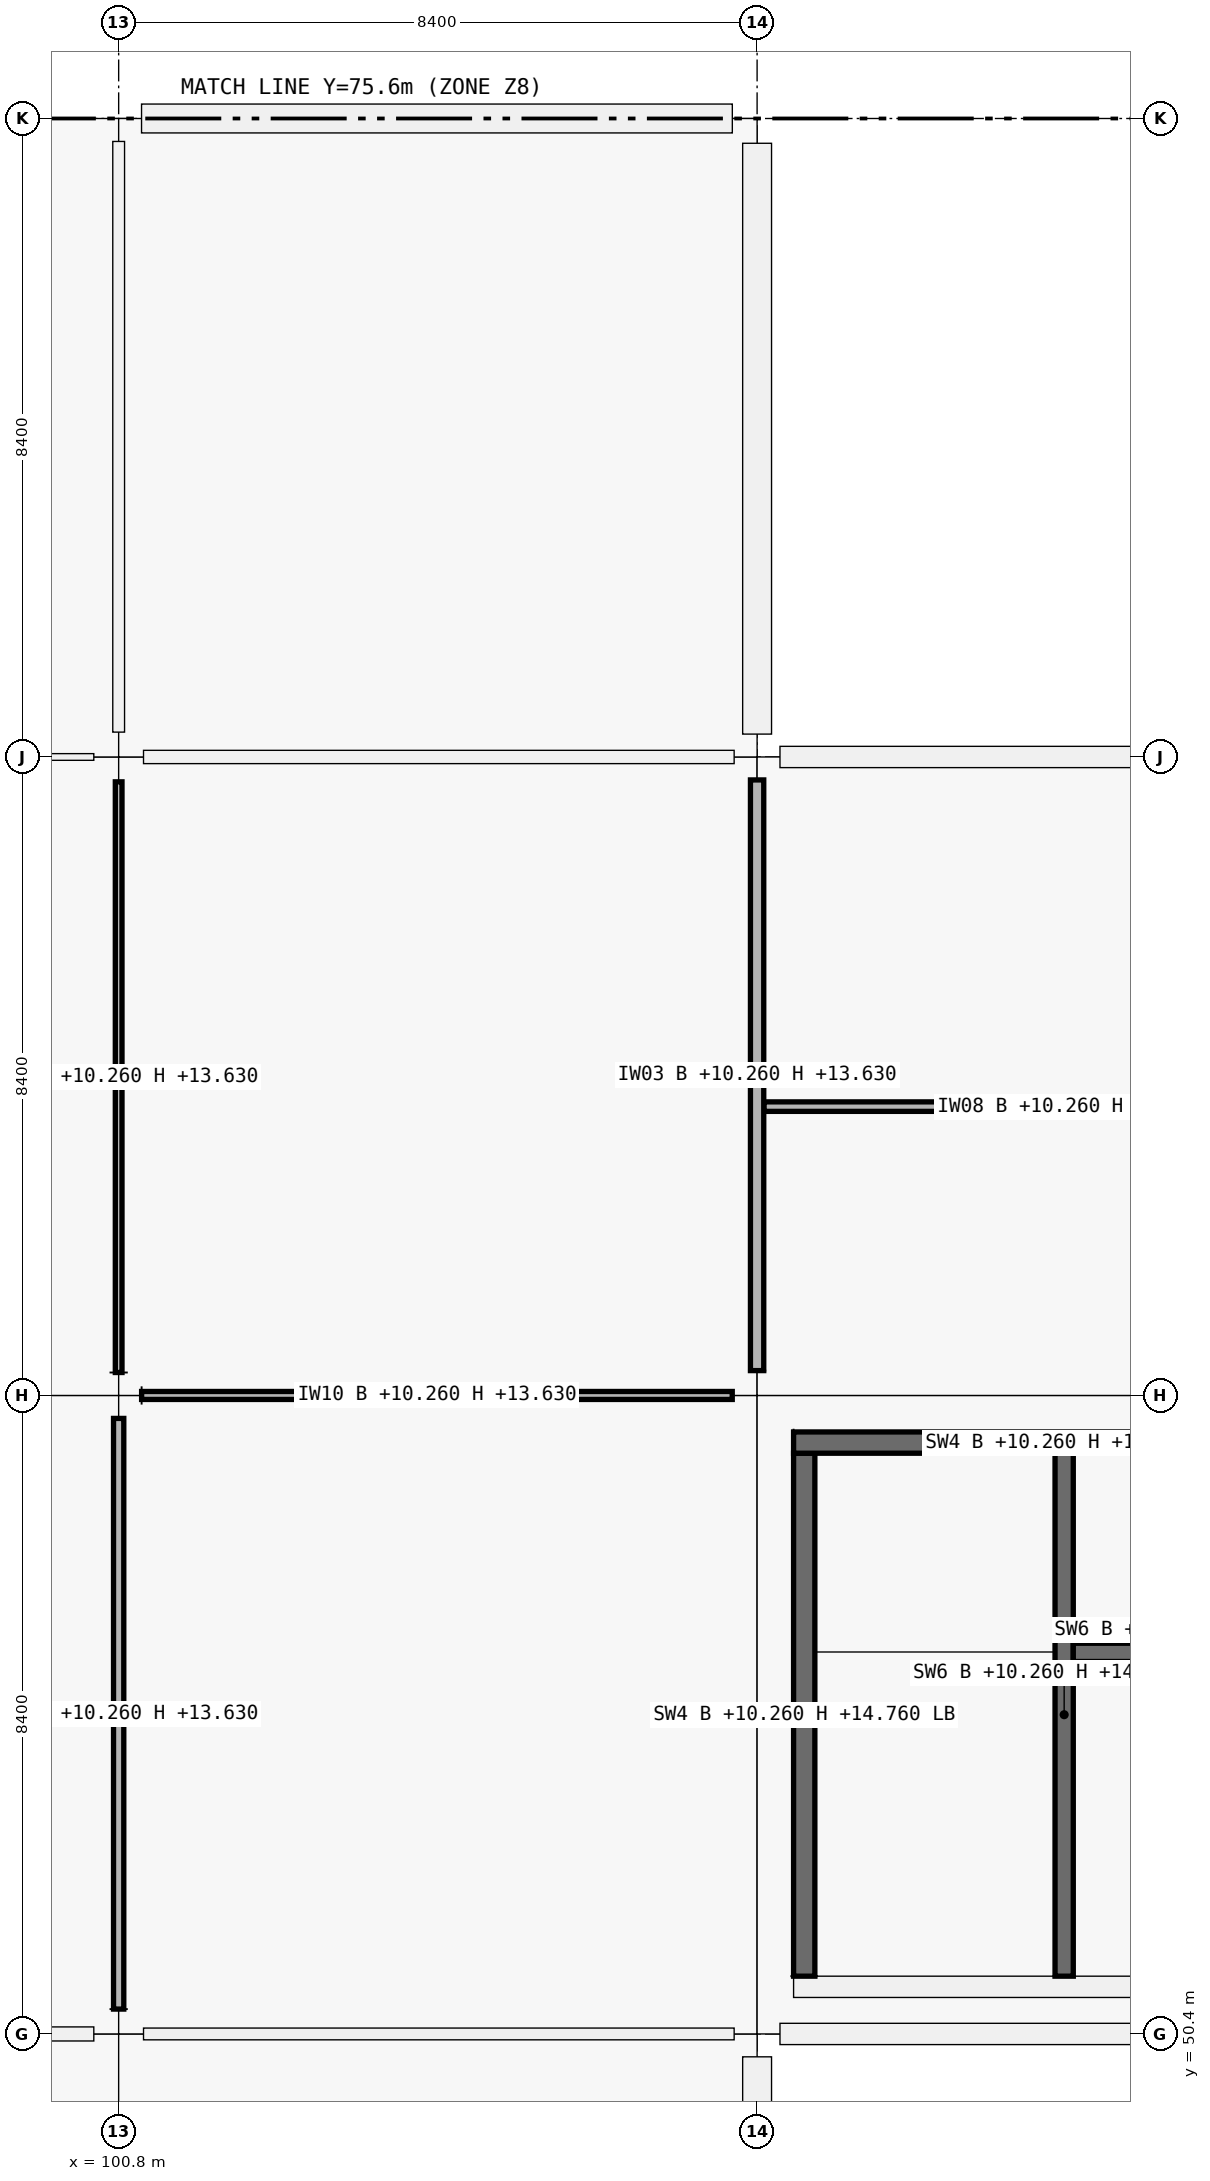
"""IFC4 building model, lengths in metres.
Left out: names, types, materials, properties, quantities, classifications, styles, units other than length and angle.
Written with IfcOpenShell. Run it as: python <this file> out.ifc"""

import sys

from ifc_helpers import new_model, si_unit, direction, frame, frame_2d, origin, origin_2d, place, context, subcontext, project, spatial, rectangle, extrude, element, fill, save


model = new_model("IFC4")
c1 = context("Model", 3, precision=1e-05, world=origin(), true_north=direction((0.0, 1.0)))
c2 = subcontext(c1, "Body", "Model", "MODEL_VIEW")
j1 = project(units=[si_unit("LENGTHUNIT", "METRE"), si_unit("PLANEANGLEUNIT", "RADIAN")], contexts=[c1])
p1 = place(None, origin())
s1 = spatial("IfcSite", under=j1, at=p1, CompositionType="ELEMENT")
p2 = place(p1, origin())
s2 = spatial("IfcBuilding", under=s1, at=p2, CompositionType="ELEMENT")
p3 = place(p2, frame((0.0, 0.0, 10.26)))
s3 = spatial("IfcBuildingStorey", under=s2, at=p3, CompositionType="ELEMENT", Elevation=10.26)
p4 = place(p3, frame((100.8, 50.4, 0.0), z_axis=(0.0, 0.0, 1.0), x_axis=(1.0, 0.0, 0.0)))
e1 = element("IfcColumn", 1, at=p4, inside=s3, PredefinedType="COLUMN", context=c2, shape_type="SweptSolid", body=[
    extrude(rectangle(XDim=0.65, YDim=0.65, at=origin_2d()), origin(), (0.0, 0.0, 1.0), 4.5),
])
p5 = place(p3, frame((100.8, 58.8, -0.3), z_axis=(0.0, 0.0, 1.0), x_axis=(1.0, 0.0, 0.0)))
e2 = element("IfcColumn", 2, at=p5, inside=s3, PredefinedType="COLUMN", context=c2, shape_type="SweptSolid", body=[
    extrude(rectangle(XDim=0.6, YDim=0.6, at=origin_2d()), origin(), (0.0, 0.0, 1.0), 4.8),
])
p6 = place(p3, frame((100.8, 67.2, 0.0), z_axis=(0.0, 0.0, 1.0), x_axis=(1.0, 0.0, 0.0)))
e3 = element("IfcColumn", 3, at=p6, inside=s3, PredefinedType="COLUMN", context=c2, shape_type="SweptSolid", body=[
    extrude(rectangle(XDim=0.65, YDim=0.65, at=origin_2d()), origin(), (0.0, 0.0, 1.0), 4.5),
])
for number, where, z_axis, x_axis in (
    (4, (100.8, 75.6, 0.0), (0.0, 0.0, 1.0), (1.0, 0.0, 0.0)),
    (5, (109.2, 50.4, 0.0), (0.0, 0.0, 1.0), (1.0, 0.0, 0.0)),
):
    element("IfcColumn", number, at=place(p3, frame(where, z_axis=z_axis, x_axis=x_axis)), inside=s3, PredefinedType="COLUMN", context=c2, shape_type="SweptSolid", body=[
        extrude(rectangle(XDim=0.6, YDim=0.6, at=origin_2d()), origin(), (0.0, 0.0, 1.0), 4.5),
    ])
p7 = place(p3, frame((109.2, 58.8, 0.0), z_axis=(0.0, 0.0, 1.0), x_axis=(1.0, 0.0, 0.0)))
e6 = element("IfcColumn", 6, at=p7, inside=s3, PredefinedType="COLUMN", context=c2, shape_type="SweptSolid", body=[
    extrude(rectangle(XDim=0.65, YDim=0.65, at=origin_2d()), origin(), (0.0, 0.0, 1.0), 4.5),
])
p8 = place(p3, frame((109.2, 67.2, 0.0), z_axis=(0.0, 0.0, 1.0), x_axis=(1.0, 0.0, 0.0)))
e7 = element("IfcColumn", 7, at=p8, inside=s3, PredefinedType="COLUMN", context=c2, shape_type="SweptSolid", body=[
    extrude(rectangle(XDim=0.6, YDim=0.6, at=origin_2d()), origin(), (0.0, 0.0, 1.0), 4.5),
])
p9 = place(p3, frame((109.2, 75.6, 0.0), z_axis=(0.0, 0.0, 1.0), x_axis=(1.0, 0.0, 0.0)))
e8 = element("IfcColumn", 8, at=p9, inside=s3, PredefinedType="COLUMN", context=c2, shape_type="SweptSolid", body=[
    extrude(rectangle(XDim=0.65, YDim=0.65, at=origin_2d()), origin(), (0.0, 0.0, 1.0), 4.5),
])
p10 = place(p3, frame((109.2, 50.099, 0.0), z_axis=(0.0, 0.0, 1.0), x_axis=(0.0, -1.0, 0.0)))
e9 = element("IfcWall", 9, at=p10, inside=s3, PredefinedType="SOLIDWALL", context=c2, shape_type="SweptSolid", body=[
    extrude(rectangle(XDim=7.773, YDim=0.38, at=frame_2d((3.887, 0.0))), origin(), (0.0, 0.0, 1.0), 3.54),
])
for number, where, z_axis, x_axis in (
    (10, (101.101, 75.6, 0.0), (0.0, 0.0, 1.0), (1.0, 0.0, 0.0)),
    (11, (109.2, 75.274, 0.0), (0.0, 0.0, 1.0), (0.0, -1.0, 0.0)),
):
    element("IfcWall", number, at=place(p3, frame(where, z_axis=z_axis, x_axis=x_axis)), inside=s3, PredefinedType="SOLIDWALL", context=c2, shape_type="SweptSolid", body=[
        extrude(rectangle(XDim=7.773, YDim=0.38, at=frame_2d((3.886, 0.0))), origin(), (0.0, 0.0, 1.0), 3.54),
    ])
p11 = place(p3, frame((117.274, 50.4, 0.0), z_axis=(0.0, 0.0, 1.0), x_axis=(-1.0, 0.0, 0.0)))
e12 = element("IfcWall", 12, at=p11, inside=s3, PredefinedType="SOLIDWALL", context=c2, shape_type="SweptSolid", body=[
    extrude(rectangle(XDim=7.773, YDim=0.28, at=frame_2d((3.886, 0.0))), origin(), (0.0, 0.0, 1.0), 3.54),
])
p12 = place(p3, frame((109.501, 67.2, 0.0), z_axis=(0.0, 0.0, 1.0), x_axis=(1.0, 0.0, 0.0)))
e13 = element("IfcWall", 13, at=p12, inside=s3, PredefinedType="SOLIDWALL", context=c2, shape_type="SweptSolid", body=[
    extrude(rectangle(XDim=7.823, YDim=0.28, at=frame_2d((3.912, 0.0))), origin(), (0.0, 0.0, 1.0), 3.54),
])
p13 = place(p12, frame((2.837, 0.0, 0.9)))
e14 = element("IfcOpeningElement", 14, at=p13, cuts=e13, PredefinedType="OPENING", context=c2, shape_type="SweptSolid", body=[
    extrude(rectangle(XDim=2.15, YDim=1.95, at=frame_2d((1.075, 0.975))), frame((0.0, 0.14, 0.0), z_axis=(0.0, -1.0, 0.0), x_axis=(1.0, 0.0, 0.0)), (0.0, 0.0, 1.0), 0.28),
])
p14 = place(p3, frame((117.12, 51.02, 0.0), z_axis=(0.0, 0.0, 1.0), x_axis=(-1.0, 0.0, 0.0)))
e15 = element("IfcWall", 15, at=p14, inside=s3, PredefinedType="SHEAR", context=c2, shape_type="SweptSolid", body=[
    extrude(rectangle(XDim=7.44, YDim=0.28, at=frame_2d((3.72, 0.0))), origin(), (0.0, 0.0, 1.0), 4.5),
])
p15 = place(p3, frame((109.82, 51.16, 0.0), z_axis=(0.0, 0.0, 1.0), x_axis=(0.0, 1.0, 0.0)))
e16 = element("IfcWall", 16, at=p15, inside=s3, PredefinedType="SHEAR", context=c2, shape_type="SweptSolid", body=[
    extrude(rectangle(XDim=6.88, YDim=0.28, at=frame_2d((3.44, 0.0))), origin(), (0.0, 0.0, 1.0), 4.5),
])
p16 = place(p3, frame((109.68, 58.18, 0.0), z_axis=(0.0, 0.0, 1.0), x_axis=(1.0, 0.0, 0.0)))
e17 = element("IfcWall", 17, at=p16, inside=s3, PredefinedType="SHEAR", context=c2, shape_type="SweptSolid", body=[
    extrude(rectangle(XDim=7.44, YDim=0.28, at=frame_2d((3.72, 0.0))), origin(), (0.0, 0.0, 1.0), 4.5),
])
p17 = place(p3, frame((113.24, 51.16, 0.0), z_axis=(0.0, 0.0, 1.0), x_axis=(0.0, 1.0, 0.0)))
e18 = element("IfcWall", 18, at=p17, inside=s3, PredefinedType="SHEAR", context=c2, shape_type="SweptSolid", body=[
    extrude(rectangle(XDim=6.88, YDim=0.24, at=frame_2d((3.44, 0.0))), origin(), (0.0, 0.0, 1.0), 4.5),
])
p18 = place(p17, frame((0.12, 0.0, 0.0)))
e19 = element("IfcOpeningElement", 19, at=p18, cuts=e18, PredefinedType="OPENING", context=c2, shape_type="SweptSolid", body=[
    extrude(rectangle(XDim=1.0, YDim=2.15, at=frame_2d((0.5, 1.075))), frame((0.0, 0.12, 0.0), z_axis=(0.0, -1.0, 0.0), x_axis=(1.0, 0.0, 0.0)), (0.0, 0.0, 1.0), 0.24),
])
p19 = place(p3, frame((113.36, 55.42, 0.0), z_axis=(0.0, 0.0, 1.0), x_axis=(1.0, 0.0, 0.0)))
e20 = element("IfcWall", 20, at=p19, inside=s3, PredefinedType="SHEAR", context=c2, shape_type="SweptSolid", body=[
    extrude(rectangle(XDim=3.48, YDim=0.24, at=frame_2d((1.74, 0.0))), origin(), (0.0, 0.0, 1.0), 4.5),
])
p20 = place(p19, frame((1.19, 0.0, 0.0)))
e21 = element("IfcOpeningElement", 21, at=p20, cuts=e20, PredefinedType="OPENING", context=c2, shape_type="SweptSolid", body=[
    extrude(rectangle(XDim=1.1, YDim=2.15, at=frame_2d((0.55, 1.075))), frame((0.0, 0.12, 0.0), z_axis=(0.0, -1.0, 0.0), x_axis=(1.0, 0.0, 0.0)), (0.0, 0.0, 1.0), 0.24),
])
p21 = place(p3, frame((92.702, 50.4, 0.0), z_axis=(0.0, 0.0, 1.0), x_axis=(1.0, 0.0, 0.0)))
e22 = element("IfcWall", 22, at=p21, inside=s3, PredefinedType="PARTITIONING", context=c2, shape_type="SweptSolid", body=[
    extrude(rectangle(XDim=7.771, YDim=0.185, at=frame_2d((3.885, 0.0))), origin(), (0.0, 0.0, 1.0), 3.37),
])
p22 = place(p21, frame((3.035, 0.0, 0.0)))
e23 = element("IfcOpeningElement", 23, at=p22, cuts=e22, PredefinedType="OPENING", context=c2, shape_type="SweptSolid", body=[
    extrude(rectangle(XDim=1.7, YDim=2.35, at=frame_2d((0.85, 1.175))), frame((0.0, 0.093, 0.0), z_axis=(0.0, -1.0, 0.0), x_axis=(1.0, 0.0, 0.0)), (0.0, 0.0, 1.0), 0.185),
])
p23 = place(p3, frame((92.702, 67.2, 0.0), z_axis=(0.0, 0.0, 1.0), x_axis=(1.0, 0.0, 0.0)))
e24 = element("IfcWall", 24, at=p23, inside=s3, PredefinedType="PARTITIONING", context=c2, shape_type="SweptSolid", body=[
    extrude(rectangle(XDim=7.771, YDim=0.088, at=frame_2d((3.885, 0.0))), origin(), (0.0, 0.0, 1.0), 3.37),
])
p24 = place(p23, frame((3.085, 0.0, 0.0)))
e25 = element("IfcOpeningElement", 25, at=p24, cuts=e24, PredefinedType="OPENING", context=c2, shape_type="SweptSolid", body=[
    extrude(rectangle(XDim=1.6, YDim=2.3, at=frame_2d((0.8, 1.15))), frame((0.0, 0.044, 0.0), z_axis=(0.0, -1.0, 0.0), x_axis=(1.0, 0.0, 0.0)), (0.0, 0.0, 1.0), 0.088),
])
p25 = place(p3, frame((101.127, 50.4, 0.0), z_axis=(0.0, 0.0, 1.0), x_axis=(1.0, 0.0, 0.0)))
e26 = element("IfcWall", 26, at=p25, inside=s3, PredefinedType="PARTITIONING", context=c2, shape_type="SweptSolid", body=[
    extrude(rectangle(XDim=7.771, YDim=0.155, at=frame_2d((3.885, 0.0))), origin(), (0.0, 0.0, 1.0), 3.37),
])
p26 = place(p25, frame((3.135, 0.0, 0.0)))
e27 = element("IfcOpeningElement", 27, at=p26, cuts=e26, PredefinedType="OPENING", context=c2, shape_type="SweptSolid", body=[
    extrude(rectangle(XDim=1.5, YDim=2.25, at=frame_2d((0.75, 1.125))), frame((0.0, 0.078, 0.0), z_axis=(0.0, -1.0, 0.0), x_axis=(1.0, 0.0, 0.0)), (0.0, 0.0, 1.0), 0.155),
])
p27 = place(p3, frame((101.102, 58.8, 0.0), z_axis=(0.0, 0.0, 1.0), x_axis=(1.0, 0.0, 0.0)))
e28 = element("IfcWall", 28, at=p27, inside=s3, PredefinedType="PARTITIONING", context=c2, shape_type="SweptSolid", body=[
    extrude(rectangle(XDim=7.771, YDim=0.105, at=frame_2d((3.885, 0.0))), origin(), (0.0, 0.0, 1.0), 3.37),
])
p28 = place(p27, frame((3.16, 0.0, 0.0)))
e29 = element("IfcOpeningElement", 29, at=p28, cuts=e28, PredefinedType="OPENING", context=c2, shape_type="SweptSolid", body=[
    extrude(rectangle(XDim=1.45, YDim=2.2, at=frame_2d((0.725, 1.1))), frame((0.0, 0.052, 0.0), z_axis=(0.0, -1.0, 0.0), x_axis=(1.0, 0.0, 0.0)), (0.0, 0.0, 1.0), 0.105),
])
p29 = place(p3, frame((101.127, 67.2, 0.0), z_axis=(0.0, 0.0, 1.0), x_axis=(1.0, 0.0, 0.0)))
e30 = element("IfcWall", 30, at=p29, inside=s3, PredefinedType="PARTITIONING", context=c2, shape_type="SweptSolid", body=[
    extrude(rectangle(XDim=7.771, YDim=0.175, at=frame_2d((3.885, 0.0))), origin(), (0.0, 0.0, 1.0), 3.37),
])
p30 = place(p29, frame((3.186, 0.0, 0.0)))
e31 = element("IfcOpeningElement", 31, at=p30, cuts=e30, PredefinedType="OPENING", context=c2, shape_type="SweptSolid", body=[
    extrude(rectangle(XDim=1.4, YDim=2.25, at=frame_2d((0.7, 1.125))), frame((0.0, 0.087, 0.0), z_axis=(0.0, -1.0, 0.0), x_axis=(1.0, 0.0, 0.0)), (0.0, 0.0, 1.0), 0.175),
])
p31 = place(p3, frame((100.8, 50.727, 0.0), z_axis=(0.0, 0.0, 1.0), x_axis=(0.0, 1.0, 0.0)))
e32 = element("IfcWall", 32, at=p31, inside=s3, PredefinedType="PARTITIONING", context=c2, shape_type="SweptSolid", body=[
    extrude(rectangle(XDim=7.771, YDim=0.135, at=frame_2d((3.885, 0.0))), origin(), (0.0, 0.0, 1.0), 3.37),
])
p32 = place(p31, frame((3.035, 0.0, 0.0)))
e33 = element("IfcOpeningElement", 33, at=p32, cuts=e32, PredefinedType="OPENING", context=c2, shape_type="SweptSolid", body=[
    extrude(rectangle(XDim=1.7, YDim=2.35, at=frame_2d((0.85, 1.175))), frame((0.0, 0.067, 0.0), z_axis=(0.0, -1.0, 0.0), x_axis=(1.0, 0.0, 0.0)), (0.0, 0.0, 1.0), 0.135),
])
p33 = place(p3, frame((100.8, 59.102, 0.0), z_axis=(0.0, 0.0, 1.0), x_axis=(0.0, 1.0, 0.0)))
e34 = element("IfcWall", 34, at=p33, inside=s3, PredefinedType="PARTITIONING", context=c2, shape_type="SweptSolid", body=[
    extrude(rectangle(XDim=7.771, YDim=0.088, at=frame_2d((3.885, 0.0))), origin(), (0.0, 0.0, 1.0), 3.37),
])
p34 = place(p33, frame((3.085, 0.0, 0.0)))
e35 = element("IfcOpeningElement", 35, at=p34, cuts=e34, PredefinedType="OPENING", context=c2, shape_type="SweptSolid", body=[
    extrude(rectangle(XDim=1.6, YDim=2.3, at=frame_2d((0.8, 1.15))), frame((0.0, 0.044, 0.0), z_axis=(0.0, -1.0, 0.0), x_axis=(1.0, 0.0, 0.0)), (0.0, 0.0, 1.0), 0.088),
])
p35 = place(p3, frame((100.8, 67.527, 0.0), z_axis=(0.0, 0.0, 1.0), x_axis=(0.0, 1.0, 0.0)))
e36 = element("IfcWall", 36, at=p35, inside=s3, PredefinedType="PARTITIONING", context=c2, shape_type="SweptSolid", body=[
    extrude(rectangle(XDim=7.771, YDim=0.155, at=frame_2d((3.885, 0.0))), origin(), (0.0, 0.0, 1.0), 3.37),
])
p36 = place(p35, frame((3.401, 0.0, 0.0)))
e37 = element("IfcOpeningElement", 37, at=p36, cuts=e36, PredefinedType="OPENING", context=c2, shape_type="SweptSolid", body=[
    extrude(rectangle(XDim=0.97, YDim=2.12, at=frame_2d((0.485, 1.06))), frame((0.0, 0.078, 0.0), z_axis=(0.0, -1.0, 0.0), x_axis=(1.0, 0.0, 0.0)), (0.0, 0.0, 1.0), 0.155),
])
p37 = place(p3, frame((109.2, 59.127, 0.0), z_axis=(0.0, 0.0, 1.0), x_axis=(0.0, 1.0, 0.0)))
e38 = element("IfcWall", 38, at=p37, inside=s3, PredefinedType="PARTITIONING", context=c2, shape_type="SweptSolid", body=[
    extrude(rectangle(XDim=7.771, YDim=0.175, at=frame_2d((3.885, 0.0))), origin(), (0.0, 0.0, 1.0), 3.37),
])
p38 = place(p3, frame((109.29, 62.6, 0.0), z_axis=(0.0, 0.0, 1.0), x_axis=(1.0, 0.0, 0.0)))
e39 = element("IfcWall", 39, at=p38, inside=s3, PredefinedType="PARTITIONING", context=c2, shape_type="SweptSolid", body=[
    extrude(rectangle(XDim=8.236, YDim=0.125, at=frame_2d((4.118, 0.0))), origin(), (0.0, 0.0, 1.0), 3.37),
])
p39 = place(p13, origin())
e40 = element("IfcWindow", 40, at=p39, inside=s3, PartitioningType="SINGLE_PANEL", PredefinedType="WINDOW", context=c2, shape_type="SweptSolid", body=[
    extrude(rectangle(XDim=2.15, YDim=1.95, at=frame_2d((1.075, 0.975))), frame((0.0, 0.03, 0.0), z_axis=(0.0, -1.0, 0.0), x_axis=(1.0, 0.0, 0.0)), (0.0, 0.0, 1.0), 0.06),
])
fill(e14, e40)
p40 = place(p18, origin())
e41 = element("IfcDoor", 41, at=p40, inside=s3, OperationType="SINGLE_SWING_LEFT", PredefinedType="DOOR", context=c2, shape_type="SweptSolid", body=[
    extrude(rectangle(XDim=1.0, YDim=2.15, at=frame_2d((0.5, 1.075))), frame((0.0, 0.025, 0.0), z_axis=(0.0, -1.0, 0.0), x_axis=(1.0, 0.0, 0.0)), (0.0, 0.0, 1.0), 0.05),
])
fill(e19, e41)
p41 = place(p26, origin())
e42 = element("IfcDoor", 42, at=p41, inside=s3, OperationType="DOUBLE_DOOR_SINGLE_SWING", PredefinedType="DOOR", context=c2, shape_type="SweptSolid", body=[
    extrude(rectangle(XDim=1.5, YDim=2.25, at=frame_2d((0.75, 1.125))), frame((0.0, 0.025, 0.0), z_axis=(0.0, -1.0, 0.0), x_axis=(1.0, 0.0, 0.0)), (0.0, 0.0, 1.0), 0.05),
])
fill(e27, e42)
p42 = place(p28, origin())
e43 = element("IfcDoor", 43, at=p42, inside=s3, OperationType="DOUBLE_DOOR_SINGLE_SWING", PredefinedType="DOOR", context=c2, shape_type="SweptSolid", body=[
    extrude(rectangle(XDim=1.45, YDim=2.2, at=frame_2d((0.725, 1.1))), frame((0.0, 0.025, 0.0), z_axis=(0.0, -1.0, 0.0), x_axis=(1.0, 0.0, 0.0)), (0.0, 0.0, 1.0), 0.05),
])
fill(e29, e43)
p43 = place(p30, origin())
e44 = element("IfcDoor", 44, at=p43, inside=s3, OperationType="DOUBLE_DOOR_SINGLE_SWING", PredefinedType="DOOR", context=c2, shape_type="SweptSolid", body=[
    extrude(rectangle(XDim=1.4, YDim=2.25, at=frame_2d((0.7, 1.125))), frame((0.0, 0.025, 0.0), z_axis=(0.0, -1.0, 0.0), x_axis=(1.0, 0.0, 0.0)), (0.0, 0.0, 1.0), 0.05),
])
fill(e31, e44)
p44 = place(p32, origin())
e45 = element("IfcDoor", 45, at=p44, inside=s3, OperationType="DOUBLE_DOOR_SINGLE_SWING", PredefinedType="DOOR", context=c2, shape_type="SweptSolid", body=[
    extrude(rectangle(XDim=1.7, YDim=2.35, at=frame_2d((0.85, 1.175))), frame((0.0, 0.025, 0.0), z_axis=(0.0, -1.0, 0.0), x_axis=(1.0, 0.0, 0.0)), (0.0, 0.0, 1.0), 0.05),
])
fill(e33, e45)
p45 = place(p34, origin())
e46 = element("IfcDoor", 46, at=p45, inside=s3, OperationType="DOUBLE_DOOR_SINGLE_SWING", PredefinedType="DOOR", context=c2, shape_type="SweptSolid", body=[
    extrude(rectangle(XDim=1.6, YDim=2.3, at=frame_2d((0.8, 1.15))), frame((0.0, 0.025, 0.0), z_axis=(0.0, -1.0, 0.0), x_axis=(1.0, 0.0, 0.0)), (0.0, 0.0, 1.0), 0.05),
])
fill(e35, e46)
p46 = place(p36, origin())
e47 = element("IfcDoor", 47, at=p46, inside=s3, OperationType="SINGLE_SWING_RIGHT", PredefinedType="DOOR", context=c2, shape_type="SweptSolid", body=[
    extrude(rectangle(XDim=0.97, YDim=2.12, at=frame_2d((0.485, 1.06))), frame((0.0, 0.025, 0.0), z_axis=(0.0, -1.0, 0.0), x_axis=(1.0, 0.0, 0.0)), (0.0, 0.0, 1.0), 0.05),
])
fill(e37, e47)
save(model, sys.argv[1])
